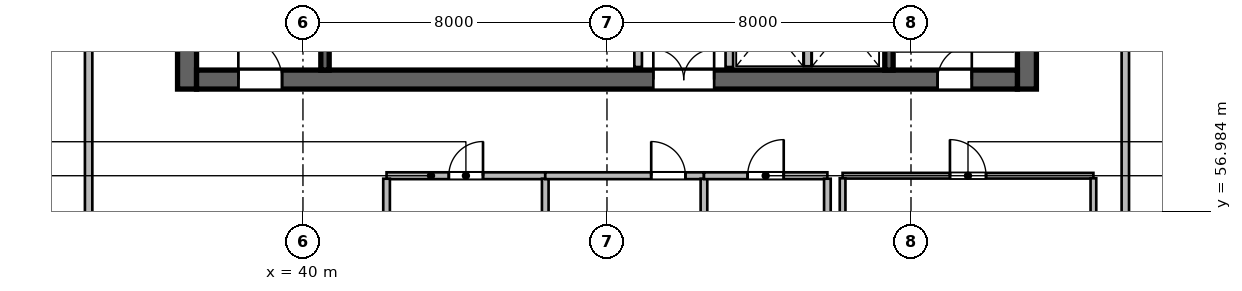
"""IFC4 building model, lengths in metres.
Left out: names, types, materials, properties, quantities, classifications, styles, units other than length and angle.
Written with IfcOpenShell. Run it as: python <this file> out.ifc"""

import sys

from ifc_helpers import new_model, si_unit, direction, frame, frame_2d, origin, place, context, subcontext, project, spatial, rectangle, extrude, source, transform, mapped, element, fill, save


model = new_model("IFC4")
c1 = context("Model", 3, precision=1e-05, world=origin(), true_north=direction((0.0, 1.0)))
c2 = subcontext(c1, "Body", "Model", "MODEL_VIEW")
j1 = project(units=[si_unit("LENGTHUNIT", "METRE"), si_unit("PLANEANGLEUNIT", "RADIAN")], contexts=[c1])
p1 = place(None, origin())
s1 = spatial("IfcSite", under=j1, at=p1, CompositionType="ELEMENT")
p2 = place(p1, origin())
s2 = spatial("IfcBuilding", under=s1, at=p2, CompositionType="ELEMENT")
p3 = place(p2, frame((0.0, 0.0, 158.4)))
s3 = spatial("IfcBuildingStorey", under=s2, at=p3, CompositionType="ELEMENT", Elevation=158.4)
m1 = source(origin(), c2, "Body", "SweptSolid", [
    extrude(rectangle(XDim=12.0, YDim=0.5, at=frame_2d((6.0, 0.0))), origin(), (0.0, 0.0, 1.0), 3.9),
])
for number, where, z_axis, x_axis in (
    (1, (36.95, 60.2, 0.0), (0.0, 0.0, 1.0), (0.0, 1.0, 0.0)),
    (2, (59.05, 60.2, 0.0), (0.0, 0.0, 1.0), (0.0, 1.0, 0.0)),
):
    element("IfcWall", number, at=place(p3, frame(where, z_axis=z_axis, x_axis=x_axis)), inside=s3, PredefinedType="SHEAR", context=c2, shape_type="MappedRepresentation", body=[
        mapped(m1, transform((0.0, 0.0, 0.0), scale=1.0)),
    ])
m2 = source(origin(), c2, "Body", "SweptSolid", [
    extrude(rectangle(XDim=21.6, YDim=0.5, at=frame_2d((10.8, 0.0))), origin(), (0.0, 0.0, 1.0), 3.9),
])
p4 = place(p3, frame((37.2, 60.45, 0.0), z_axis=(0.0, 0.0, 1.0), x_axis=(1.0, 0.0, 0.0)))
e3 = element("IfcWall", 3, at=p4, inside=s3, PredefinedType="SHEAR", context=c2, shape_type="MappedRepresentation", body=[
    mapped(m2, transform((0.0, 0.0, 0.0), scale=1.0)),
])
p5 = place(p4, frame((1.1, 0.0, 0.0)))
e4 = element("IfcOpeningElement", 4, at=p5, cuts=e3, PredefinedType="OPENING", context=c2, shape_type="SweptSolid", body=[
    extrude(rectangle(XDim=1.15, YDim=2.15, at=frame_2d((0.575, 1.075))), frame((0.0, 0.26, 0.0), z_axis=(0.0, -1.0, 0.0), x_axis=(1.0, 0.0, 0.0)), (0.0, 0.0, 1.0), 0.52),
])
p6 = place(p4, frame((19.5, 0.0, 0.0)))
e5 = element("IfcOpeningElement", 5, at=p6, cuts=e3, PredefinedType="OPENING", context=c2, shape_type="SweptSolid", body=[
    extrude(rectangle(XDim=0.9, YDim=2.1, at=frame_2d((0.45, 1.05))), frame((0.0, 0.26, 0.0), z_axis=(0.0, -1.0, 0.0), x_axis=(1.0, 0.0, 0.0)), (0.0, 0.0, 1.0), 0.52),
])
p7 = place(p4, frame((12.02, 0.0, 0.0)))
e6 = element("IfcOpeningElement", 6, at=p7, cuts=e3, PredefinedType="OPENING", context=c2, shape_type="SweptSolid", body=[
    extrude(rectangle(XDim=1.6, YDim=2.15, at=frame_2d((0.8, 1.075))), frame((0.0, 0.26, 0.0), z_axis=(0.0, -1.0, 0.0), x_axis=(1.0, 0.0, 0.0)), (0.0, 0.0, 1.0), 0.52),
])
m3 = source(origin(), c2, "Body", "SweptSolid", [
    extrude(rectangle(XDim=11.0, YDim=0.22, at=frame_2d((5.5, 0.0))), origin(), (0.0, 0.0, 1.0), 3.9),
])
p8 = place(p3, frame((40.58, 60.7, 0.0), z_axis=(0.0, 0.0, 1.0), x_axis=(0.0, 1.0, 0.0)))
e7 = element("IfcWall", 7, at=p8, inside=s3, PredefinedType="SHEAR", context=c2, shape_type="MappedRepresentation", body=[
    mapped(m3, transform((0.0, 0.0, 0.0), scale=1.0)),
])
p9 = place(p3, frame((55.42, 60.7, 0.0), z_axis=(0.0, 0.0, 1.0), x_axis=(0.0, 1.0, 0.0)))
e8 = element("IfcWall", 8, at=p9, inside=s3, PredefinedType="SHEAR", context=c2, shape_type="MappedRepresentation", body=[
    mapped(m3, transform((0.0, 0.0, 0.0), scale=1.0)),
])
p10 = place(p9, frame((9.545, 0.0, 0.0)))
e9 = element("IfcOpeningElement", 9, at=p10, cuts=e8, PredefinedType="OPENING", context=c2, shape_type="SweptSolid", body=[
    extrude(rectangle(XDim=1.15, YDim=2.15, at=frame_2d((0.575, 1.075))), frame((0.0, 0.12, 0.0), z_axis=(0.0, -1.0, 0.0), x_axis=(1.0, 0.0, 0.0)), (0.0, 0.0, 1.0), 0.24),
])
m4 = source(origin(), c2, "Body", "SweptSolid", [
    extrude(rectangle(XDim=2.24, YDim=0.2, at=frame_2d((1.12, 0.0))), origin(), (0.0, 0.0, 1.0), 3.65),
])
for number, where, z_axis, x_axis in (
    (10, (48.82, 60.78, 0.0), (0.0, 0.0, 1.0), (0.0, 1.0, 0.0)),
    (11, (51.22, 60.78, 0.0), (0.0, 0.0, 1.0), (0.0, 1.0, 0.0)),
):
    element("IfcWall", number, at=place(p3, frame(where, z_axis=z_axis, x_axis=x_axis)), inside=s3, PredefinedType="SOLIDWALL", context=c2, shape_type="MappedRepresentation", body=[
        mapped(m4, transform((0.0, 0.0, 0.0), scale=1.0)),
    ])
m5 = source(origin(), c2, "Body", "SweptSolid", [
    extrude(rectangle(XDim=2.2, YDim=0.2, at=frame_2d((1.1, 0.0))), origin(), (0.0, 0.0, 1.0), 3.65),
])
p11 = place(p3, frame((53.28, 60.8, 0.0), z_axis=(0.0, 0.0, 1.0), x_axis=(0.0, 1.0, 0.0)))
e12 = element("IfcWall", 12, at=p11, inside=s3, PredefinedType="SOLIDWALL", context=c2, shape_type="MappedRepresentation", body=[
    mapped(m5, transform((0.0, 0.0, 0.0), scale=1.0)),
])
m6 = source(origin(), c2, "Body", "SweptSolid", [
    extrude(rectangle(XDim=4.176, YDim=0.18, at=frame_2d((2.088, 0.0))), origin(), (0.0, 0.0, 1.0), 3.65),
])
p12 = place(p3, frame((42.2, 57.92, 0.0), z_axis=(0.0, 0.0, 1.0), x_axis=(1.0, 0.0, 0.0)))
e13 = element("IfcWall", 13, at=p12, inside=s3, PredefinedType="PLUMBINGWALL", context=c2, shape_type="MappedRepresentation", body=[
    mapped(m6, transform((0.0, 0.0, 0.0), scale=1.0)),
])
p13 = place(p12, frame((1.638, 0.0, 0.0)))
e14 = element("IfcOpeningElement", 14, at=p13, cuts=e13, PredefinedType="OPENING", context=c2, shape_type="SweptSolid", body=[
    extrude(rectangle(XDim=0.9, YDim=2.08, at=frame_2d((0.45, 1.04))), frame((0.0, 0.1, 0.0), z_axis=(0.0, -1.0, 0.0), x_axis=(1.0, 0.0, 0.0)), (0.0, 0.0, 1.0), 0.2),
])
m7 = source(origin(), c2, "Body", "SweptSolid", [
    extrude(rectangle(XDim=3.763, YDim=0.175, at=frame_2d((1.881, 0.0))), origin(), (0.0, 0.0, 1.0), 3.65),
])
p14 = place(p3, frame((42.2, 54.079, 0.0), z_axis=(0.0, 0.0, 1.0), x_axis=(0.0, 1.0, 0.0)))
e15 = element("IfcWall", 15, at=p14, inside=s3, PredefinedType="PARTITIONING", context=c2, shape_type="MappedRepresentation", body=[
    mapped(m7, transform((0.0, 0.0, 0.0), scale=1.0)),
])
m8 = source(origin(), c2, "Body", "SweptSolid", [
    extrude(rectangle(XDim=3.065, YDim=0.175, at=frame_2d((1.533, 0.0))), origin(), (0.0, 0.0, 1.0), 3.65),
])
p15 = place(p3, frame((46.376, 54.776, 0.0), z_axis=(0.0, 0.0, 1.0), x_axis=(0.0, 1.0, 0.0)))
e16 = element("IfcWall", 16, at=p15, inside=s3, PredefinedType="PARTITIONING", context=c2, shape_type="MappedRepresentation", body=[
    mapped(m8, transform((0.0, 0.0, 0.0), scale=1.0)),
])
p16 = place(p3, frame((46.376, 57.92, 0.0), z_axis=(0.0, 0.0, 1.0), x_axis=(1.0, 0.0, 0.0)))
e17 = element("IfcWall", 17, at=p16, inside=s3, PredefinedType="PLUMBINGWALL", context=c2, shape_type="MappedRepresentation", body=[
    mapped(m6, transform((0.0, 0.0, 0.0), scale=1.0)),
])
p17 = place(p16, frame((2.788, 0.0, 0.0)))
e18 = element("IfcOpeningElement", 18, at=p17, cuts=e17, PredefinedType="OPENING", context=c2, shape_type="SweptSolid", body=[
    extrude(rectangle(XDim=0.9, YDim=2.08, at=frame_2d((0.45, 1.04))), frame((0.0, 0.1, 0.0), z_axis=(0.0, -1.0, 0.0), x_axis=(1.0, 0.0, 0.0)), (0.0, 0.0, 1.0), 0.2),
])
m9 = source(origin(), c2, "Body", "SweptSolid", [
    extrude(rectangle(XDim=3.136, YDim=0.175, at=frame_2d((1.568, 0.0))), origin(), (0.0, 0.0, 1.0), 3.65),
])
p18 = place(p3, frame((50.552, 54.705, 0.0), z_axis=(0.0, 0.0, 1.0), x_axis=(0.0, 1.0, 0.0)))
e19 = element("IfcWall", 19, at=p18, inside=s3, PredefinedType="PARTITIONING", context=c2, shape_type="MappedRepresentation", body=[
    mapped(m9, transform((0.0, 0.0, 0.0), scale=1.0)),
])
m10 = source(origin(), c2, "Body", "SweptSolid", [
    extrude(rectangle(XDim=3.248, YDim=0.18, at=frame_2d((1.624, 0.0))), origin(), (0.0, 0.0, 1.0), 3.65),
])
p19 = place(p3, frame((50.552, 57.92, 0.0), z_axis=(0.0, 0.0, 1.0), x_axis=(1.0, 0.0, 0.0)))
e20 = element("IfcWall", 20, at=p19, inside=s3, PredefinedType="PLUMBINGWALL", context=c2, shape_type="MappedRepresentation", body=[
    mapped(m10, transform((0.0, 0.0, 0.0), scale=1.0)),
])
p20 = place(p19, frame((1.149, 0.0, 0.0)))
e21 = element("IfcOpeningElement", 21, at=p20, cuts=e20, PredefinedType="OPENING", context=c2, shape_type="SweptSolid", body=[
    extrude(rectangle(XDim=0.95, YDim=2.12, at=frame_2d((0.475, 1.06))), frame((0.0, 0.1, 0.0), z_axis=(0.0, -1.0, 0.0), x_axis=(1.0, 0.0, 0.0)), (0.0, 0.0, 1.0), 0.2),
])
p21 = place(p3, frame((53.8, 54.079, 0.0), z_axis=(0.0, 0.0, 1.0), x_axis=(0.0, 1.0, 0.0)))
e22 = element("IfcWall", 22, at=p21, inside=s3, PredefinedType="PARTITIONING", context=c2, shape_type="MappedRepresentation", body=[
    mapped(m7, transform((0.0, 0.0, 0.0), scale=1.0)),
])
m11 = source(origin(), c2, "Body", "SweptSolid", [
    extrude(rectangle(XDim=6.6, YDim=0.15, at=frame_2d((3.3, 0.0))), origin(), (0.0, 0.0, 1.0), 3.65),
])
p22 = place(p3, frame((54.2, 57.92, 0.0), z_axis=(0.0, 0.0, 1.0), x_axis=(1.0, 0.0, 0.0)))
e23 = element("IfcWall", 23, at=p22, inside=s3, PredefinedType="PARTITIONING", context=c2, shape_type="MappedRepresentation", body=[
    mapped(m11, transform((0.0, 0.0, 0.0), scale=1.0)),
])
p23 = place(p22, frame((2.825, 0.0, 0.0)))
e24 = element("IfcOpeningElement", 24, at=p23, cuts=e23, PredefinedType="OPENING", context=c2, shape_type="SweptSolid", body=[
    extrude(rectangle(XDim=0.95, YDim=2.1, at=frame_2d((0.475, 1.05))), frame((0.0, 0.085, 0.0), z_axis=(0.0, -1.0, 0.0), x_axis=(1.0, 0.0, 0.0)), (0.0, 0.0, 1.0), 0.17),
])
m12 = source(origin(), c2, "Body", "SweptSolid", [
    extrude(rectangle(XDim=3.785, YDim=0.15, at=frame_2d((1.893, 0.0))), origin(), (0.0, 0.0, 1.0), 3.65),
])
for number, where, z_axis, x_axis in (
    (25, (54.2, 54.067, 0.0), (0.0, 0.0, 1.0), (0.0, 1.0, 0.0)),
    (26, (60.8, 54.067, 0.0), (0.0, 0.0, 1.0), (0.0, 1.0, 0.0)),
):
    element("IfcWall", number, at=place(p3, frame(where, z_axis=z_axis, x_axis=x_axis)), inside=s3, PredefinedType="PARTITIONING", context=c2, shape_type="MappedRepresentation", body=[
        mapped(m12, transform((0.0, 0.0, 0.0), scale=1.0)),
    ])
m13 = source(origin(), c2, "Body", "SweptSolid", [
    extrude(rectangle(XDim=12.126, YDim=0.195, at=frame_2d((6.063, 0.0))), origin(), (0.0, 0.0, 1.0), 3.65),
])
p24 = place(p3, frame((34.36, 49.334, 0.0), z_axis=(0.0, 0.0, 1.0), x_axis=(0.0, 1.0, 0.0)))
e27 = element("IfcWall", 27, at=p24, inside=s3, PredefinedType="PARTITIONING", context=c2, shape_type="MappedRepresentation", body=[
    mapped(m13, transform((0.0, 0.0, 0.0), scale=1.0)),
])
m14 = source(origin(), c2, "Body", "SweptSolid", [
    extrude(rectangle(XDim=12.126, YDim=0.195, at=frame_2d((6.063, 0.0))), origin(), (0.0, 0.0, 1.0), 2.942),
])
p25 = place(p3, frame((61.64, 49.334, 0.0), z_axis=(0.0, 0.0, 1.0), x_axis=(0.0, 1.0, 0.0)))
e28 = element("IfcWall", 28, at=p25, inside=s3, PredefinedType="PARTITIONING", context=c2, shape_type="MappedRepresentation", body=[
    mapped(m14, transform((0.0, 0.0, 0.0), scale=1.0)),
])
m15 = source(origin(), c2, "Body", "SweptSolid", [
    extrude(rectangle(XDim=1.15, YDim=2.15, at=frame_2d((0.575, 1.075))), frame((0.0, 0.025, 0.0), z_axis=(0.0, -1.0, 0.0), x_axis=(1.0, 0.0, 0.0)), (0.0, 0.0, 1.0), 0.05),
])
p26 = place(p5, origin())
e29 = element("IfcDoor", 29, at=p26, inside=s3, OperationType="SINGLE_SWING_LEFT", PredefinedType="DOOR", context=c2, shape_type="MappedRepresentation", body=[
    mapped(m15, transform((0.0, 0.0, 0.0), scale=1.0)),
])
fill(e4, e29)
m16 = source(origin(), c2, "Body", "SweptSolid", [
    extrude(rectangle(XDim=0.9, YDim=2.1, at=frame_2d((0.45, 1.05))), frame((0.0, 0.025, 0.0), z_axis=(0.0, -1.0, 0.0), x_axis=(1.0, 0.0, 0.0)), (0.0, 0.0, 1.0), 0.05),
])
p27 = place(p6, origin())
e30 = element("IfcDoor", 30, at=p27, inside=s3, OperationType="SINGLE_SWING_RIGHT", PredefinedType="DOOR", context=c2, shape_type="MappedRepresentation", body=[
    mapped(m16, transform((0.0, 0.0, 0.0), scale=1.0)),
])
fill(e5, e30)
m17 = source(origin(), c2, "Body", "SweptSolid", [
    extrude(rectangle(XDim=1.6, YDim=2.15, at=frame_2d((0.8, 1.075))), frame((0.0, 0.025, 0.0), z_axis=(0.0, -1.0, 0.0), x_axis=(1.0, 0.0, 0.0)), (0.0, 0.0, 1.0), 0.05),
])
p28 = place(p7, origin())
e31 = element("IfcDoor", 31, at=p28, inside=s3, OperationType="DOUBLE_DOOR_SINGLE_SWING", PredefinedType="DOOR", context=c2, shape_type="MappedRepresentation", body=[
    mapped(m17, transform((0.0, 0.0, 0.0), scale=1.0)),
])
fill(e6, e31)
m18 = source(origin(), c2, "Body", "SweptSolid", [
    extrude(rectangle(XDim=0.9, YDim=2.08, at=frame_2d((0.45, 1.04))), frame((0.0, 0.025, 0.0), z_axis=(0.0, -1.0, 0.0), x_axis=(1.0, 0.0, 0.0)), (0.0, 0.0, 1.0), 0.05),
])
p29 = place(p13, origin())
e32 = element("IfcDoor", 32, at=p29, inside=s3, OperationType="SINGLE_SWING_RIGHT", PredefinedType="DOOR", context=c2, shape_type="MappedRepresentation", body=[
    mapped(m18, transform((0.0, 0.0, 0.0), scale=1.0)),
])
fill(e14, e32)
p30 = place(p17, origin())
e33 = element("IfcDoor", 33, at=p30, inside=s3, OperationType="SINGLE_SWING_LEFT", PredefinedType="DOOR", context=c2, shape_type="MappedRepresentation", body=[
    mapped(m18, transform((0.0, 0.0, 0.0), scale=1.0)),
])
fill(e18, e33)
m19 = source(origin(), c2, "Body", "SweptSolid", [
    extrude(rectangle(XDim=0.95, YDim=2.12, at=frame_2d((0.475, 1.06))), frame((0.0, 0.025, 0.0), z_axis=(0.0, -1.0, 0.0), x_axis=(1.0, 0.0, 0.0)), (0.0, 0.0, 1.0), 0.05),
])
p31 = place(p20, origin())
e34 = element("IfcDoor", 34, at=p31, inside=s3, OperationType="SINGLE_SWING_RIGHT", PredefinedType="DOOR", context=c2, shape_type="MappedRepresentation", body=[
    mapped(m19, transform((0.0, 0.0, 0.0), scale=1.0)),
])
fill(e21, e34)
m20 = source(origin(), c2, "Body", "SweptSolid", [
    extrude(rectangle(XDim=0.95, YDim=2.1, at=frame_2d((0.475, 1.05))), frame((0.0, 0.025, 0.0), z_axis=(0.0, -1.0, 0.0), x_axis=(1.0, 0.0, 0.0)), (0.0, 0.0, 1.0), 0.05),
])
p32 = place(p23, origin())
e35 = element("IfcDoor", 35, at=p32, inside=s3, OperationType="SINGLE_SWING_LEFT", PredefinedType="DOOR", context=c2, shape_type="MappedRepresentation", body=[
    mapped(m20, transform((0.0, 0.0, 0.0), scale=1.0)),
])
fill(e24, e35)
save(model, sys.argv[1])
